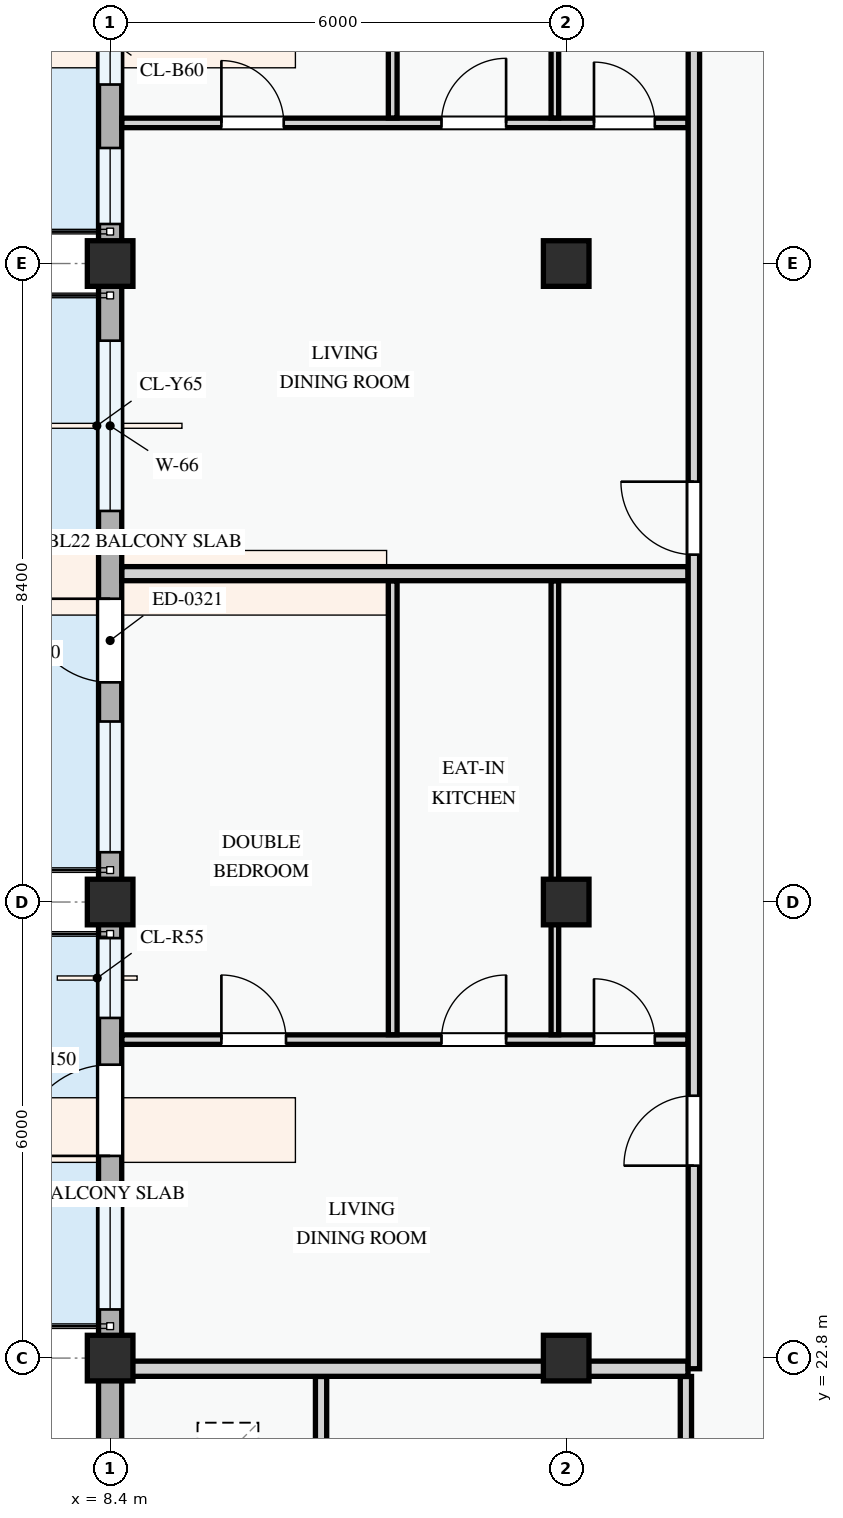
"""IFC4 building model, lengths in metres.
Left out: names, types, materials, properties, quantities, classifications, styles, units other than length and angle.
Written with IfcOpenShell. Run it as: python <this file> out.ifc"""

import sys

from ifc_helpers import new_model, si_unit, direction, frame, frame_2d, origin, origin_2d, place, context, subcontext, project, spatial, rectangle, extrude, element, fill, save


model = new_model("IFC4")
c1 = context("Model", 3, precision=1e-05, world=origin(), true_north=direction((0.0, 1.0)))
c2 = subcontext(c1, "Body", "Model", "MODEL_VIEW")
j1 = project(units=[si_unit("LENGTHUNIT", "METRE"), si_unit("PLANEANGLEUNIT", "RADIAN")], contexts=[c1])
p1 = place(None, origin())
s1 = spatial("IfcSite", under=j1, at=p1, CompositionType="ELEMENT")
p2 = place(p1, origin())
s2 = spatial("IfcBuilding", under=s1, at=p2, CompositionType="ELEMENT")
p3 = place(p2, frame((0.0, 0.0, 18.0)))
s3 = spatial("IfcBuildingStorey", under=s2, at=p3, CompositionType="ELEMENT", Elevation=18.0)
for number, where, z_axis, x_axis in (
    (1, (8.4, 22.8, 0.0), (0.0, 0.0, 1.0), (1.0, 0.0, 0.0)),
    (2, (8.4, 28.8, 0.0), (0.0, 0.0, 1.0), (1.0, 0.0, 0.0)),
    (3, (8.4, 37.2, 0.0), (0.0, 0.0, 1.0), (1.0, 0.0, 0.0)),
    (4, (14.4, 22.8, 0.0), (0.0, 0.0, 1.0), (1.0, 0.0, 0.0)),
    (5, (14.4, 28.8, 0.0), (0.0, 0.0, 1.0), (1.0, 0.0, 0.0)),
    (6, (14.4, 37.2, 0.0), (0.0, 0.0, 1.0), (1.0, 0.0, 0.0)),
):
    element("IfcColumn", number, at=place(p3, frame(where, z_axis=z_axis, x_axis=x_axis)), inside=s3, PredefinedType="COLUMN", context=c2, shape_type="SweptSolid", body=[
        extrude(rectangle(XDim=0.6, YDim=0.6, at=origin_2d()), origin(), (0.0, 0.0, 1.0), 3.3),
    ])
p4 = place(p3, frame((8.4, 43.2, 0.0), z_axis=(0.0, 0.0, 1.0), x_axis=(0.0, -1.0, 0.0)))
e7 = element("IfcWall", 7, at=p4, inside=s3, PredefinedType="STANDARD", context=c2, shape_type="SweptSolid", body=[
    extrude(rectangle(XDim=6.0, YDim=0.305, at=frame_2d((3.0, 0.0))), origin(), (0.0, 0.0, 1.0), 2.575),
])
p5 = place(p4, frame((0.62, 0.0, 0.0)))
e8 = element("IfcOpeningElement", 8, at=p5, cuts=e7, PredefinedType="OPENING", context=c2, shape_type="SweptSolid", body=[
    extrude(rectangle(XDim=1.05, YDim=2.15, at=frame_2d((0.525, 1.075))), frame((0.0, 0.163, 0.0), z_axis=(0.0, -1.0, 0.0), x_axis=(1.0, 0.0, 0.0)), (0.0, 0.0, 1.0), 0.325),
])
p6 = place(p4, frame((2.225, 0.0, 0.78)))
e9 = element("IfcOpeningElement", 9, at=p6, cuts=e7, PredefinedType="OPENING", context=c2, shape_type="SweptSolid", body=[
    extrude(rectangle(XDim=1.42, YDim=1.38, at=frame_2d((0.71, 0.69))), frame((0.0, 0.163, 0.0), z_axis=(0.0, -1.0, 0.0), x_axis=(1.0, 0.0, 0.0)), (0.0, 0.0, 1.0), 0.325),
])
p7 = place(p4, frame((4.48, 0.0, 0.78)))
e10 = element("IfcOpeningElement", 10, at=p7, cuts=e7, PredefinedType="OPENING", context=c2, shape_type="SweptSolid", body=[
    extrude(rectangle(XDim=1.0, YDim=1.25, at=frame_2d((0.5, 0.625))), frame((0.0, 0.163, 0.0), z_axis=(0.0, -1.0, 0.0), x_axis=(1.0, 0.0, 0.0)), (0.0, 0.0, 1.0), 0.325),
])
p8 = place(p3, frame((8.4, 37.2, 0.0), z_axis=(0.0, 0.0, 1.0), x_axis=(0.0, -1.0, 0.0)))
e11 = element("IfcWall", 11, at=p8, inside=s3, PredefinedType="STANDARD", context=c2, shape_type="SweptSolid", body=[
    extrude(rectangle(XDim=8.4, YDim=0.305, at=frame_2d((4.2, 0.0))), origin(), (0.0, 0.0, 1.0), 2.425),
])
p9 = place(p8, frame((4.41, 0.0, 0.0)))
e12 = element("IfcOpeningElement", 12, at=p9, cuts=e11, PredefinedType="OPENING", context=c2, shape_type="SweptSolid", body=[
    extrude(rectangle(XDim=1.1, YDim=2.15, at=frame_2d((0.55, 1.075))), frame((0.0, 0.163, 0.0), z_axis=(0.0, -1.0, 0.0), x_axis=(1.0, 0.0, 0.0)), (0.0, 0.0, 1.0), 0.325),
])
p10 = place(p8, frame((1.015, 0.0, 0.78)))
e13 = element("IfcOpeningElement", 13, at=p10, cuts=e11, PredefinedType="OPENING", context=c2, shape_type="SweptSolid", body=[
    extrude(rectangle(XDim=2.24, YDim=1.52, at=frame_2d((1.12, 0.76))), frame((0.0, 0.163, 0.0), z_axis=(0.0, -1.0, 0.0), x_axis=(1.0, 0.0, 0.0)), (0.0, 0.0, 1.0), 0.325),
])
p11 = place(p8, frame((6.025, 0.0, 0.78)))
e14 = element("IfcOpeningElement", 14, at=p11, cuts=e11, PredefinedType="OPENING", context=c2, shape_type="SweptSolid", body=[
    extrude(rectangle(XDim=1.72, YDim=1.52, at=frame_2d((0.86, 0.76))), frame((0.0, 0.163, 0.0), z_axis=(0.0, -1.0, 0.0), x_axis=(1.0, 0.0, 0.0)), (0.0, 0.0, 1.0), 0.325),
])
p12 = place(p3, frame((8.4, 28.8, 0.0), z_axis=(0.0, 0.0, 1.0), x_axis=(0.0, -1.0, 0.0)))
e15 = element("IfcWall", 15, at=p12, inside=s3, PredefinedType="STANDARD", context=c2, shape_type="SweptSolid", body=[
    extrude(rectangle(XDim=6.0, YDim=0.305, at=frame_2d((3.0, 0.0))), origin(), (0.0, 0.0, 1.0), 2.575),
])
p13 = place(p12, frame((2.14, 0.0, 0.0)))
e16 = element("IfcOpeningElement", 16, at=p13, cuts=e15, PredefinedType="OPENING", context=c2, shape_type="SweptSolid", body=[
    extrude(rectangle(XDim=1.2, YDim=2.15, at=frame_2d((0.6, 1.075))), frame((0.0, 0.163, 0.0), z_axis=(0.0, -1.0, 0.0), x_axis=(1.0, 0.0, 0.0)), (0.0, 0.0, 1.0), 0.325),
])
p14 = place(p12, frame((0.475, 0.0, 0.78)))
e17 = element("IfcOpeningElement", 17, at=p14, cuts=e15, PredefinedType="OPENING", context=c2, shape_type="SweptSolid", body=[
    extrude(rectangle(XDim=1.05, YDim=1.2, at=frame_2d((0.525, 0.6))), frame((0.0, 0.163, 0.0), z_axis=(0.0, -1.0, 0.0), x_axis=(1.0, 0.0, 0.0)), (0.0, 0.0, 1.0), 0.325),
])
p15 = place(p12, frame((3.84, 0.0, 0.78)))
e18 = element("IfcOpeningElement", 18, at=p15, cuts=e15, PredefinedType="OPENING", context=c2, shape_type="SweptSolid", body=[
    extrude(rectangle(XDim=1.52, YDim=1.42, at=frame_2d((0.76, 0.71))), frame((0.0, 0.163, 0.0), z_axis=(0.0, -1.0, 0.0), x_axis=(1.0, 0.0, 0.0)), (0.0, 0.0, 1.0), 0.325),
])
p16 = place(p3, frame((8.4, 22.8, 0.0), z_axis=(0.0, 0.0, 1.0), x_axis=(0.0, -1.0, 0.0)))
e19 = element("IfcWall", 19, at=p16, inside=s3, PredefinedType="STANDARD", context=c2, shape_type="SweptSolid", body=[
    extrude(rectangle(XDim=8.4, YDim=0.305, at=frame_2d((4.2, 0.0))), origin(), (0.0, 0.0, 1.0), 2.425),
])
p17 = place(p16, frame((1.305, 0.0, 0.78)))
e20 = element("IfcOpeningElement", 20, at=p17, cuts=e19, PredefinedType="OPENING", context=c2, shape_type="SweptSolid", body=[
    extrude(rectangle(XDim=1.78, YDim=1.42, at=frame_2d((0.89, 0.71))), frame((0.0, 0.163, 0.0), z_axis=(0.0, -1.0, 0.0), x_axis=(1.0, 0.0, 0.0)), (0.0, 0.0, 1.0), 0.325),
])
p18 = place(p16, frame((5.038, 0.0, 0.78)))
e21 = element("IfcOpeningElement", 21, at=p18, cuts=e19, PredefinedType="OPENING", context=c2, shape_type="SweptSolid", body=[
    extrude(rectangle(XDim=1.25, YDim=1.45, at=frame_2d((0.625, 0.725))), frame((0.0, 0.163, 0.0), z_axis=(0.0, -1.0, 0.0), x_axis=(1.0, 0.0, 0.0)), (0.0, 0.0, 1.0), 0.325),
])
for number, where, z_axis, x_axis in (
    (22, (11.175, 18.676, 0.0), (0.0, 0.0, 1.0), (0.0, 1.0, 0.0)),
    (23, (15.975, 18.676, 0.0), (0.0, 0.0, 1.0), (0.0, 1.0, 0.0)),
):
    element("IfcWall", number, at=place(p3, frame(where, z_axis=z_axis, x_axis=x_axis)), inside=s3, PredefinedType="PARTITIONING", context=c2, shape_type="SweptSolid", body=[
        extrude(rectangle(XDim=3.882, YDim=0.148, at=frame_2d((1.941, 0.0))), origin(), (0.0, 0.0, 1.0), 3.0),
    ])
p19 = place(p3, frame((8.554, 26.99, 0.0), z_axis=(0.0, 0.0, 1.0), x_axis=(1.0, 0.0, 0.0)))
e24 = element("IfcWall", 24, at=p19, inside=s3, PredefinedType="PARTITIONING", context=c2, shape_type="SweptSolid", body=[
    extrude(rectangle(XDim=7.448, YDim=0.125, at=frame_2d((3.724, 0.0))), origin(), (0.0, 0.0, 1.0), 3.0),
])
p20 = place(p19, frame((1.309, 0.0, 0.0)))
e25 = element("IfcOpeningElement", 25, at=p20, cuts=e24, PredefinedType="OPENING", context=c2, shape_type="SweptSolid", body=[
    extrude(rectangle(XDim=0.85, YDim=2.1, at=frame_2d((0.425, 1.05))), frame((0.0, 0.073, 0.0), z_axis=(0.0, -1.0, 0.0), x_axis=(1.0, 0.0, 0.0)), (0.0, 0.0, 1.0), 0.145),
])
p21 = place(p19, frame((4.205, 0.0, 0.0)))
e26 = element("IfcOpeningElement", 26, at=p21, cuts=e24, PredefinedType="OPENING", context=c2, shape_type="SweptSolid", body=[
    extrude(rectangle(XDim=0.85, YDim=2.1, at=frame_2d((0.425, 1.05))), frame((0.0, 0.073, 0.0), z_axis=(0.0, -1.0, 0.0), x_axis=(1.0, 0.0, 0.0)), (0.0, 0.0, 1.0), 0.145),
])
p22 = place(p19, frame((6.211, 0.0, 0.0)))
e27 = element("IfcOpeningElement", 27, at=p22, cuts=e24, PredefinedType="OPENING", context=c2, shape_type="SweptSolid", body=[
    extrude(rectangle(XDim=0.8, YDim=2.1, at=frame_2d((0.4, 1.05))), frame((0.0, 0.073, 0.0), z_axis=(0.0, -1.0, 0.0), x_axis=(1.0, 0.0, 0.0)), (0.0, 0.0, 1.0), 0.145),
])
p23 = place(p3, frame((12.118, 27.054, 0.0), z_axis=(0.0, 0.0, 1.0), x_axis=(0.0, 1.0, 0.0)))
e28 = element("IfcWall", 28, at=p23, inside=s3, PredefinedType="PARTITIONING", context=c2, shape_type="SweptSolid", body=[
    extrude(rectangle(XDim=5.971, YDim=0.115, at=frame_2d((2.985, 0.0))), origin(), (0.0, 0.0, 1.0), 3.0),
])
p24 = place(p3, frame((14.251, 27.054, 0.0), z_axis=(0.0, 0.0, 1.0), x_axis=(0.0, 1.0, 0.0)))
e29 = element("IfcWall", 29, at=p24, inside=s3, PredefinedType="PARTITIONING", context=c2, shape_type="SweptSolid", body=[
    extrude(rectangle(XDim=5.971, YDim=0.1, at=frame_2d((2.985, 0.0))), origin(), (0.0, 0.0, 1.0), 2.425),
])
p25 = place(p3, frame((8.554, 22.66, 0.0), z_axis=(0.0, 0.0, 1.0), x_axis=(1.0, 0.0, 0.0)))
e30 = element("IfcWall", 30, at=p25, inside=s3, PredefinedType="PARTITIONING", context=c2, shape_type="SweptSolid", body=[
    extrude(rectangle(XDim=7.448, YDim=0.2, at=frame_2d((3.724, 0.0))), origin(), (0.0, 0.0, 1.0), 2.375),
])
p26 = place(p3, frame((8.554, 39.05, 0.0), z_axis=(0.0, 0.0, 1.0), x_axis=(1.0, 0.0, 0.0)))
e31 = element("IfcWall", 31, at=p26, inside=s3, PredefinedType="PARTITIONING", context=c2, shape_type="SweptSolid", body=[
    extrude(rectangle(XDim=7.448, YDim=0.125, at=frame_2d((3.724, 0.0))), origin(), (0.0, 0.0, 1.0), 3.0),
])
p27 = place(p26, frame((1.309, 0.0, 0.0)))
e32 = element("IfcOpeningElement", 32, at=p27, cuts=e31, PredefinedType="OPENING", context=c2, shape_type="SweptSolid", body=[
    extrude(rectangle(XDim=0.82, YDim=2.08, at=frame_2d((0.41, 1.04))), frame((0.0, 0.073, 0.0), z_axis=(0.0, -1.0, 0.0), x_axis=(1.0, 0.0, 0.0)), (0.0, 0.0, 1.0), 0.145),
])
p28 = place(p26, frame((4.205, 0.0, 0.0)))
e33 = element("IfcOpeningElement", 33, at=p28, cuts=e31, PredefinedType="OPENING", context=c2, shape_type="SweptSolid", body=[
    extrude(rectangle(XDim=0.85, YDim=2.1, at=frame_2d((0.425, 1.05))), frame((0.0, 0.073, 0.0), z_axis=(0.0, -1.0, 0.0), x_axis=(1.0, 0.0, 0.0)), (0.0, 0.0, 1.0), 0.145),
])
p29 = place(p26, frame((6.211, 0.0, 0.0)))
e34 = element("IfcOpeningElement", 34, at=p29, cuts=e31, PredefinedType="OPENING", context=c2, shape_type="SweptSolid", body=[
    extrude(rectangle(XDim=0.8, YDim=2.1, at=frame_2d((0.4, 1.05))), frame((0.0, 0.073, 0.0), z_axis=(0.0, -1.0, 0.0), x_axis=(1.0, 0.0, 0.0)), (0.0, 0.0, 1.0), 0.145),
])
p30 = place(p3, frame((12.118, 39.115, 0.0), z_axis=(0.0, 0.0, 1.0), x_axis=(0.0, 1.0, 0.0)))
e35 = element("IfcWall", 35, at=p30, inside=s3, PredefinedType="PARTITIONING", context=c2, shape_type="SweptSolid", body=[
    extrude(rectangle(XDim=5.753, YDim=0.115, at=frame_2d((2.877, 0.0))), origin(), (0.0, 0.0, 1.0), 3.0),
])
p31 = place(p3, frame((14.251, 39.115, 0.0), z_axis=(0.0, 0.0, 1.0), x_axis=(0.0, 1.0, 0.0)))
e36 = element("IfcWall", 36, at=p31, inside=s3, PredefinedType="PARTITIONING", context=c2, shape_type="SweptSolid", body=[
    extrude(rectangle(XDim=5.753, YDim=0.1, at=frame_2d((2.877, 0.0))), origin(), (0.0, 0.0, 1.0), 2.425),
])
p32 = place(p3, frame((8.554, 33.12, 0.0), z_axis=(0.0, 0.0, 1.0), x_axis=(1.0, 0.0, 0.0)))
e37 = element("IfcWall", 37, at=p32, inside=s3, PredefinedType="PARTITIONING", context=c2, shape_type="SweptSolid", body=[
    extrude(rectangle(XDim=7.448, YDim=0.185, at=frame_2d((3.724, 0.0))), origin(), (0.0, 0.0, 1.0), 3.0),
])
p33 = place(p3, frame((16.08, 22.66, 0.0), z_axis=(0.0, 0.0, 1.0), x_axis=(0.0, 1.0, 0.0)))
e38 = element("IfcWall", 38, at=p33, inside=s3, PredefinedType="PARTITIONING", context=c2, shape_type="SweptSolid", body=[
    extrude(rectangle(XDim=34.786, YDim=0.15, at=frame_2d((17.393, 0.0))), origin(), (0.0, 0.0, 1.0), 3.0),
])
p34 = place(p33, frame((2.672, 0.0, 0.0)))
e39 = element("IfcOpeningElement", 39, at=p34, cuts=e38, PredefinedType="OPENING", context=c2, shape_type="SweptSolid", body=[
    extrude(rectangle(XDim=0.92, YDim=2.1, at=frame_2d((0.46, 1.05))), frame((0.0, 0.085, 0.0), z_axis=(0.0, -1.0, 0.0), x_axis=(1.0, 0.0, 0.0)), (0.0, 0.0, 1.0), 0.17),
])
p35 = place(p33, frame((10.71, 0.0, 0.0)))
e40 = element("IfcOpeningElement", 40, at=p35, cuts=e38, PredefinedType="OPENING", context=c2, shape_type="SweptSolid", body=[
    extrude(rectangle(XDim=0.96, YDim=2.12, at=frame_2d((0.48, 1.06))), frame((0.0, 0.085, 0.0), z_axis=(0.0, -1.0, 0.0), x_axis=(1.0, 0.0, 0.0)), (0.0, 0.0, 1.0), 0.17),
])
p36 = place(p33, frame((24.28, 0.0, 0.0)))
e41 = element("IfcOpeningElement", 41, at=p36, cuts=e38, PredefinedType="OPENING", context=c2, shape_type="SweptSolid", body=[
    extrude(rectangle(XDim=0.92, YDim=2.1, at=frame_2d((0.46, 1.05))), frame((0.0, 0.085, 0.0), z_axis=(0.0, -1.0, 0.0), x_axis=(1.0, 0.0, 0.0)), (0.0, 0.0, 1.0), 0.17),
])
p37 = place(p6, origin())
e42 = element("IfcWindow", 42, at=p37, inside=s3, PartitioningType="SINGLE_PANEL", PredefinedType="WINDOW", context=c2, shape_type="SweptSolid", body=[
    extrude(rectangle(XDim=1.42, YDim=1.38, at=frame_2d((0.71, 0.69))), frame((0.0, 0.03, 0.0), z_axis=(0.0, -1.0, 0.0), x_axis=(1.0, 0.0, 0.0)), (0.0, 0.0, 1.0), 0.06),
])
fill(e9, e42)
p38 = place(p7, origin())
e43 = element("IfcWindow", 43, at=p38, inside=s3, PartitioningType="SINGLE_PANEL", PredefinedType="WINDOW", context=c2, shape_type="SweptSolid", body=[
    extrude(rectangle(XDim=1.0, YDim=1.25, at=frame_2d((0.5, 0.625))), frame((0.0, 0.03, 0.0), z_axis=(0.0, -1.0, 0.0), x_axis=(1.0, 0.0, 0.0)), (0.0, 0.0, 1.0), 0.06),
])
fill(e10, e43)
p39 = place(p9, frame((1.1, 0.0, 0.0), z_axis=(0.0, 0.0, 1.0), x_axis=(-1.0, 0.0, 0.0)))
e44 = element("IfcDoor", 44, at=p39, inside=s3, OperationType="SINGLE_SWING_RIGHT", PredefinedType="DOOR", context=c2, shape_type="SweptSolid", body=[
    extrude(rectangle(XDim=1.1, YDim=2.15, at=frame_2d((0.55, 1.075))), frame((0.0, 0.025, 0.0), z_axis=(0.0, -1.0, 0.0), x_axis=(1.0, 0.0, 0.0)), (0.0, 0.0, 1.0), 0.05),
])
fill(e12, e44)
p40 = place(p10, origin())
e45 = element("IfcWindow", 45, at=p40, inside=s3, PartitioningType="DOUBLE_PANEL_VERTICAL", PredefinedType="WINDOW", context=c2, shape_type="SweptSolid", body=[
    extrude(rectangle(XDim=2.24, YDim=1.52, at=frame_2d((1.12, 0.76))), frame((0.0, 0.03, 0.0), z_axis=(0.0, -1.0, 0.0), x_axis=(1.0, 0.0, 0.0)), (0.0, 0.0, 1.0), 0.06),
])
fill(e13, e45)
p41 = place(p11, origin())
e46 = element("IfcWindow", 46, at=p41, inside=s3, PartitioningType="DOUBLE_PANEL_VERTICAL", PredefinedType="WINDOW", context=c2, shape_type="SweptSolid", body=[
    extrude(rectangle(XDim=1.72, YDim=1.52, at=frame_2d((0.86, 0.76))), frame((0.0, 0.03, 0.0), z_axis=(0.0, -1.0, 0.0), x_axis=(1.0, 0.0, 0.0)), (0.0, 0.0, 1.0), 0.06),
])
fill(e14, e46)
p42 = place(p13, frame((1.2, 0.0, 0.0), z_axis=(0.0, 0.0, 1.0), x_axis=(-1.0, 0.0, 0.0)))
e47 = element("IfcDoor", 47, at=p42, inside=s3, OperationType="SINGLE_SWING_LEFT", PredefinedType="DOOR", context=c2, shape_type="SweptSolid", body=[
    extrude(rectangle(XDim=1.2, YDim=2.15, at=frame_2d((0.6, 1.075))), frame((0.0, 0.025, 0.0), z_axis=(0.0, -1.0, 0.0), x_axis=(1.0, 0.0, 0.0)), (0.0, 0.0, 1.0), 0.05),
])
fill(e16, e47)
p43 = place(p14, origin())
e48 = element("IfcWindow", 48, at=p43, inside=s3, PartitioningType="SINGLE_PANEL", PredefinedType="WINDOW", context=c2, shape_type="SweptSolid", body=[
    extrude(rectangle(XDim=1.05, YDim=1.2, at=frame_2d((0.525, 0.6))), frame((0.0, 0.03, 0.0), z_axis=(0.0, -1.0, 0.0), x_axis=(1.0, 0.0, 0.0)), (0.0, 0.0, 1.0), 0.06),
])
fill(e17, e48)
p44 = place(p15, origin())
e49 = element("IfcWindow", 49, at=p44, inside=s3, PartitioningType="SINGLE_PANEL", PredefinedType="WINDOW", context=c2, shape_type="SweptSolid", body=[
    extrude(rectangle(XDim=1.52, YDim=1.42, at=frame_2d((0.76, 0.71))), frame((0.0, 0.03, 0.0), z_axis=(0.0, -1.0, 0.0), x_axis=(1.0, 0.0, 0.0)), (0.0, 0.0, 1.0), 0.06),
])
fill(e18, e49)
p45 = place(p20, origin())
e50 = element("IfcDoor", 50, at=p45, inside=s3, OperationType="SINGLE_SWING_LEFT", PredefinedType="DOOR", context=c2, shape_type="SweptSolid", body=[
    extrude(rectangle(XDim=0.85, YDim=2.1, at=frame_2d((0.425, 1.05))), frame((0.0, 0.025, 0.0), z_axis=(0.0, -1.0, 0.0), x_axis=(1.0, 0.0, 0.0)), (0.0, 0.0, 1.0), 0.05),
])
fill(e25, e50)
p46 = place(p21, origin())
e51 = element("IfcDoor", 51, at=p46, inside=s3, OperationType="SINGLE_SWING_RIGHT", PredefinedType="DOOR", context=c2, shape_type="SweptSolid", body=[
    extrude(rectangle(XDim=0.85, YDim=2.1, at=frame_2d((0.425, 1.05))), frame((0.0, 0.025, 0.0), z_axis=(0.0, -1.0, 0.0), x_axis=(1.0, 0.0, 0.0)), (0.0, 0.0, 1.0), 0.05),
])
fill(e26, e51)
p47 = place(p22, origin())
e52 = element("IfcDoor", 52, at=p47, inside=s3, OperationType="SINGLE_SWING_LEFT", PredefinedType="DOOR", context=c2, shape_type="SweptSolid", body=[
    extrude(rectangle(XDim=0.8, YDim=2.1, at=frame_2d((0.4, 1.05))), frame((0.0, 0.025, 0.0), z_axis=(0.0, -1.0, 0.0), x_axis=(1.0, 0.0, 0.0)), (0.0, 0.0, 1.0), 0.05),
])
fill(e27, e52)
p48 = place(p27, origin())
e53 = element("IfcDoor", 53, at=p48, inside=s3, OperationType="SINGLE_SWING_LEFT", PredefinedType="DOOR", context=c2, shape_type="SweptSolid", body=[
    extrude(rectangle(XDim=0.82, YDim=2.08, at=frame_2d((0.41, 1.04))), frame((0.0, 0.025, 0.0), z_axis=(0.0, -1.0, 0.0), x_axis=(1.0, 0.0, 0.0)), (0.0, 0.0, 1.0), 0.05),
])
fill(e32, e53)
p49 = place(p28, origin())
e54 = element("IfcDoor", 54, at=p49, inside=s3, OperationType="SINGLE_SWING_RIGHT", PredefinedType="DOOR", context=c2, shape_type="SweptSolid", body=[
    extrude(rectangle(XDim=0.85, YDim=2.1, at=frame_2d((0.425, 1.05))), frame((0.0, 0.025, 0.0), z_axis=(0.0, -1.0, 0.0), x_axis=(1.0, 0.0, 0.0)), (0.0, 0.0, 1.0), 0.05),
])
fill(e33, e54)
p50 = place(p29, origin())
e55 = element("IfcDoor", 55, at=p50, inside=s3, OperationType="SINGLE_SWING_LEFT", PredefinedType="DOOR", context=c2, shape_type="SweptSolid", body=[
    extrude(rectangle(XDim=0.8, YDim=2.1, at=frame_2d((0.4, 1.05))), frame((0.0, 0.025, 0.0), z_axis=(0.0, -1.0, 0.0), x_axis=(1.0, 0.0, 0.0)), (0.0, 0.0, 1.0), 0.05),
])
fill(e34, e55)
p51 = place(p34, origin())
e56 = element("IfcDoor", 56, at=p51, inside=s3, OperationType="SINGLE_SWING_LEFT", PredefinedType="DOOR", context=c2, shape_type="SweptSolid", body=[
    extrude(rectangle(XDim=0.92, YDim=2.1, at=frame_2d((0.46, 1.05))), frame((0.0, 0.025, 0.0), z_axis=(0.0, -1.0, 0.0), x_axis=(1.0, 0.0, 0.0)), (0.0, 0.0, 1.0), 0.05),
])
fill(e39, e56)
p52 = place(p35, origin())
e57 = element("IfcDoor", 57, at=p52, inside=s3, OperationType="SINGLE_SWING_RIGHT", PredefinedType="DOOR", context=c2, shape_type="SweptSolid", body=[
    extrude(rectangle(XDim=0.96, YDim=2.12, at=frame_2d((0.48, 1.06))), frame((0.0, 0.025, 0.0), z_axis=(0.0, -1.0, 0.0), x_axis=(1.0, 0.0, 0.0)), (0.0, 0.0, 1.0), 0.05),
])
fill(e40, e57)
save(model, sys.argv[1])
